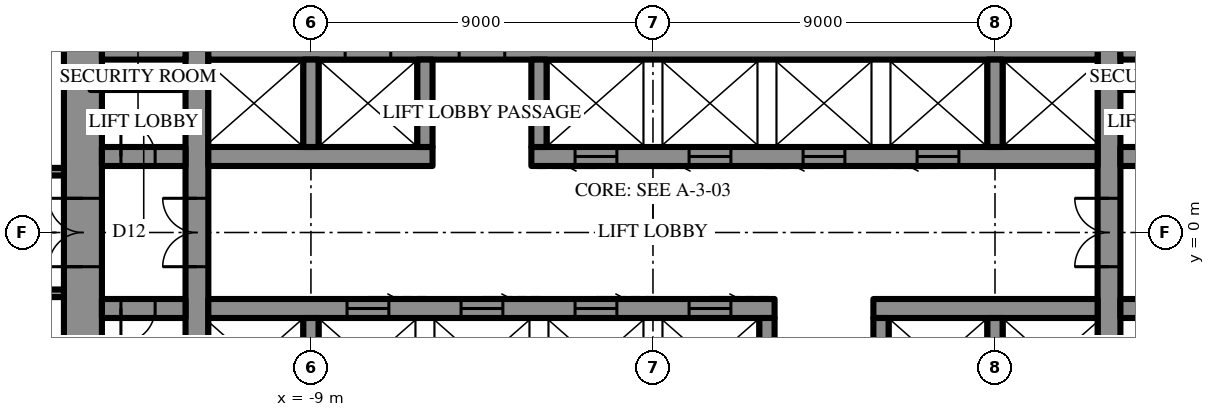
"""IFC4 building model, lengths in metres.
Left out: names, types, materials, properties, quantities, classifications, styles, units other than length and angle.
Written with IfcOpenShell. Run it as: python <this file> out.ifc"""

import sys

from ifc_helpers import new_model, si_unit, direction, frame, frame_2d, origin, place, context, subcontext, project, spatial, rectangle, extrude, element, fill, save


model = new_model("IFC4")
c1 = context("Model", 3, precision=1e-05, world=origin(), true_north=direction((0.0, 1.0)))
c2 = subcontext(c1, "Body", "Model", "MODEL_VIEW")
j1 = project(units=[si_unit("LENGTHUNIT", "METRE"), si_unit("PLANEANGLEUNIT", "RADIAN")], contexts=[c1])
p1 = place(None, origin())
s1 = spatial("IfcSite", under=j1, at=p1, CompositionType="ELEMENT")
p2 = place(p1, origin())
s2 = spatial("IfcBuilding", under=s1, at=p2, CompositionType="ELEMENT")
p3 = place(p2, frame((0.0, 0.0, 253.3)))
s3 = spatial("IfcBuildingStorey", under=s2, at=p3, CompositionType="ELEMENT", Elevation=253.3)
p4 = place(p3, frame((-15.0, 10.7, 0.0), z_axis=(0.0, 0.0, 1.0), x_axis=(0.0, -1.0, 0.0)))
e1 = element("IfcWall", 1, at=p4, inside=s3, PredefinedType="SHEAR", context=c2, shape_type="SweptSolid", body=[
    extrude(rectangle(XDim=21.4, YDim=1.0, at=frame_2d((10.7, 0.0))), origin(), (0.0, 0.0, 1.0), 4.2),
])
p5 = place(p4, frame((9.8, 0.0, 0.0)))
e2 = element("IfcOpeningElement", 2, at=p5, cuts=e1, PredefinedType="OPENING", context=c2, shape_type="SweptSolid", body=[
    extrude(rectangle(XDim=1.8, YDim=2.4, at=frame_2d((0.9, 1.2))), frame((0.0, 0.51, 0.0), z_axis=(0.0, -1.0, 0.0), x_axis=(1.0, 0.0, 0.0)), (0.0, 0.0, 1.0), 1.02),
])
p6 = place(p3, frame((12.0, -10.7, 0.0), z_axis=(0.0, 0.0, 1.0), x_axis=(0.0, 1.0, 0.0)))
e3 = element("IfcWall", 3, at=p6, inside=s3, PredefinedType="SHEAR", context=c2, shape_type="SweptSolid", body=[
    extrude(rectangle(XDim=21.4, YDim=0.6, at=frame_2d((10.7, 0.0))), origin(), (0.0, 0.0, 1.0), 4.2),
])
p7 = place(p6, frame((9.8, 0.0, 0.0)))
e4 = element("IfcOpeningElement", 4, at=p7, cuts=e3, PredefinedType="OPENING", context=c2, shape_type="SweptSolid", body=[
    extrude(rectangle(XDim=1.8, YDim=2.4, at=frame_2d((0.9, 1.2))), frame((0.0, 0.31, 0.0), z_axis=(0.0, -1.0, 0.0), x_axis=(1.0, 0.0, 0.0)), (0.0, 0.0, 1.0), 0.62),
])
p8 = place(p3, frame((-12.0, -10.7, 0.0), z_axis=(0.0, 0.0, 1.0), x_axis=(0.0, 1.0, 0.0)))
e5 = element("IfcWall", 5, at=p8, inside=s3, PredefinedType="SHEAR", context=c2, shape_type="SweptSolid", body=[
    extrude(rectangle(XDim=21.4, YDim=0.6, at=frame_2d((10.7, 0.0))), origin(), (0.0, 0.0, 1.0), 4.2),
])
p9 = place(p8, frame((9.8, 0.0, 0.0)))
e6 = element("IfcOpeningElement", 6, at=p9, cuts=e5, PredefinedType="OPENING", context=c2, shape_type="SweptSolid", body=[
    extrude(rectangle(XDim=1.8, YDim=2.4, at=frame_2d((0.9, 1.2))), frame((0.0, 0.31, 0.0), z_axis=(0.0, -1.0, 0.0), x_axis=(1.0, 0.0, 0.0)), (0.0, 0.0, 1.0), 0.62),
])
p10 = place(p3, frame((-14.5, 2.0, 0.0), z_axis=(0.0, 0.0, 1.0), x_axis=(1.0, 0.0, 0.0)))
e7 = element("IfcWall", 7, at=p10, inside=s3, PredefinedType="SHEAR", context=c2, shape_type="SweptSolid", body=[
    extrude(rectangle(XDim=2.2, YDim=0.5, at=frame_2d((1.1, 0.0))), origin(), (0.0, 0.0, 1.0), 4.2),
])
p11 = place(p10, frame((0.5, 0.0, 0.0)))
e8 = element("IfcOpeningElement", 8, at=p11, cuts=e7, PredefinedType="OPENING", context=c2, shape_type="SweptSolid", body=[
    extrude(rectangle(XDim=0.9, YDim=2.2, at=frame_2d((0.45, 1.1))), frame((0.0, 0.26, 0.0), z_axis=(0.0, -1.0, 0.0), x_axis=(1.0, 0.0, 0.0)), (0.0, 0.0, 1.0), 0.52),
])
p12 = place(p3, frame((-11.7, 2.0, 0.0), z_axis=(0.0, 0.0, 1.0), x_axis=(1.0, 0.0, 0.0)))
e9 = element("IfcWall", 9, at=p12, inside=s3, PredefinedType="SHEAR", context=c2, shape_type="SweptSolid", body=[
    extrude(rectangle(XDim=5.9, YDim=0.5, at=frame_2d((2.95, 0.0))), origin(), (0.0, 0.0, 1.0), 4.2),
])
p13 = place(p3, frame((-3.2, 2.0, 0.0), z_axis=(0.0, 0.0, 1.0), x_axis=(1.0, 0.0, 0.0)))
e10 = element("IfcWall", 10, at=p13, inside=s3, PredefinedType="SHEAR", context=c2, shape_type="SweptSolid", body=[
    extrude(rectangle(XDim=14.9, YDim=0.5, at=frame_2d((7.45, 0.0))), origin(), (0.0, 0.0, 1.0), 4.2),
])
p14 = place(p13, frame((1.15, 0.0, 0.0)))
e11 = element("IfcOpeningElement", 11, at=p14, cuts=e10, PredefinedType="OPENING", context=c2, shape_type="SweptSolid", body=[
    extrude(rectangle(XDim=1.1, YDim=2.2, at=frame_2d((0.55, 1.1))), frame((0.0, 0.26, 0.0), z_axis=(0.0, -1.0, 0.0), x_axis=(1.0, 0.0, 0.0)), (0.0, 0.0, 1.0), 0.52),
])
p15 = place(p13, frame((4.15, 0.0, 0.0)))
e12 = element("IfcOpeningElement", 12, at=p15, cuts=e10, PredefinedType="OPENING", context=c2, shape_type="SweptSolid", body=[
    extrude(rectangle(XDim=1.1, YDim=2.2, at=frame_2d((0.55, 1.1))), frame((0.0, 0.26, 0.0), z_axis=(0.0, -1.0, 0.0), x_axis=(1.0, 0.0, 0.0)), (0.0, 0.0, 1.0), 0.52),
])
p16 = place(p13, frame((7.15, 0.0, 0.0)))
e13 = element("IfcOpeningElement", 13, at=p16, cuts=e10, PredefinedType="OPENING", context=c2, shape_type="SweptSolid", body=[
    extrude(rectangle(XDim=1.1, YDim=2.2, at=frame_2d((0.55, 1.1))), frame((0.0, 0.26, 0.0), z_axis=(0.0, -1.0, 0.0), x_axis=(1.0, 0.0, 0.0)), (0.0, 0.0, 1.0), 0.52),
])
p17 = place(p13, frame((10.15, 0.0, 0.0)))
e14 = element("IfcOpeningElement", 14, at=p17, cuts=e10, PredefinedType="OPENING", context=c2, shape_type="SweptSolid", body=[
    extrude(rectangle(XDim=1.1, YDim=2.2, at=frame_2d((0.55, 1.1))), frame((0.0, 0.26, 0.0), z_axis=(0.0, -1.0, 0.0), x_axis=(1.0, 0.0, 0.0)), (0.0, 0.0, 1.0), 0.52),
])
p18 = place(p3, frame((12.3, 2.0, 0.0), z_axis=(0.0, 0.0, 1.0), x_axis=(1.0, 0.0, 0.0)))
e15 = element("IfcWall", 15, at=p18, inside=s3, PredefinedType="SHEAR", context=c2, shape_type="SweptSolid", body=[
    extrude(rectangle(XDim=2.2, YDim=0.5, at=frame_2d((1.1, 0.0))), origin(), (0.0, 0.0, 1.0), 4.2),
])
p19 = place(p18, frame((0.8, 0.0, 0.0)))
e16 = element("IfcOpeningElement", 16, at=p19, cuts=e15, PredefinedType="OPENING", context=c2, shape_type="SweptSolid", body=[
    extrude(rectangle(XDim=0.9, YDim=2.2, at=frame_2d((0.45, 1.1))), frame((0.0, 0.26, 0.0), z_axis=(0.0, -1.0, 0.0), x_axis=(1.0, 0.0, 0.0)), (0.0, 0.0, 1.0), 0.52),
])
p20 = place(p3, frame((-14.5, 4.8, 0.0), z_axis=(0.0, 0.0, 1.0), x_axis=(1.0, 0.0, 0.0)))
e17 = element("IfcWall", 17, at=p20, inside=s3, PredefinedType="SHEAR", context=c2, shape_type="SweptSolid", body=[
    extrude(rectangle(XDim=2.2, YDim=0.5, at=frame_2d((1.1, 0.0))), origin(), (0.0, 0.0, 1.0), 4.2),
])
p21 = place(p3, frame((-11.7, 4.8, 0.0), z_axis=(0.0, 0.0, 1.0), x_axis=(1.0, 0.0, 0.0)))
e18 = element("IfcWall", 18, at=p21, inside=s3, PredefinedType="SHEAR", context=c2, shape_type="SweptSolid", body=[
    extrude(rectangle(XDim=23.4, YDim=0.5, at=frame_2d((11.7, 0.0))), origin(), (0.0, 0.0, 1.0), 4.2),
])
p22 = place(p21, frame((6.6, 0.0, 0.0)))
e19 = element("IfcOpeningElement", 19, at=p22, cuts=e18, PredefinedType="OPENING", context=c2, shape_type="SweptSolid", body=[
    extrude(rectangle(XDim=1.2, YDim=2.2, at=frame_2d((0.6, 1.1))), frame((0.0, 0.26, 0.0), z_axis=(0.0, -1.0, 0.0), x_axis=(1.0, 0.0, 0.0)), (0.0, 0.0, 1.0), 0.52),
])
p23 = place(p21, frame((3.6, 0.0, 0.0)))
e20 = element("IfcOpeningElement", 20, at=p23, cuts=e18, PredefinedType="OPENING", context=c2, shape_type="SweptSolid", body=[
    extrude(rectangle(XDim=1.2, YDim=2.2, at=frame_2d((0.6, 1.1))), frame((0.0, 0.26, 0.0), z_axis=(0.0, -1.0, 0.0), x_axis=(1.0, 0.0, 0.0)), (0.0, 0.0, 1.0), 0.52),
])
p24 = place(p3, frame((12.3, 4.8, 0.0), z_axis=(0.0, 0.0, 1.0), x_axis=(1.0, 0.0, 0.0)))
e21 = element("IfcWall", 21, at=p24, inside=s3, PredefinedType="SHEAR", context=c2, shape_type="SweptSolid", body=[
    extrude(rectangle(XDim=2.2, YDim=0.5, at=frame_2d((1.1, 0.0))), origin(), (0.0, 0.0, 1.0), 4.2),
])
for number, where, z_axis, x_axis in (
    (22, (-9.0, 2.25, 0.0), (0.0, 0.0, 1.0), (0.0, 1.0, 0.0)),
    (23, (-6.0, 2.25, 0.0), (0.0, 0.0, 1.0), (0.0, 1.0, 0.0)),
    (24, (-3.0, 2.25, 0.0), (0.0, 0.0, 1.0), (0.0, 1.0, 0.0)),
    (25, (9.0, 2.25, 0.0), (0.0, 0.0, 1.0), (0.0, 1.0, 0.0)),
):
    element("IfcWall", number, at=place(p3, frame(where, z_axis=z_axis, x_axis=x_axis)), inside=s3, PredefinedType="SHEAR", context=c2, shape_type="SweptSolid", body=[
        extrude(rectangle(XDim=2.3, YDim=0.4, at=frame_2d((1.15, 0.0))), origin(), (0.0, 0.0, 1.0), 4.2),
    ])
p25 = place(p3, frame((14.5, -2.0, 0.0), z_axis=(0.0, 0.0, 1.0), x_axis=(-1.0, 0.0, 0.0)))
e26 = element("IfcWall", 26, at=p25, inside=s3, PredefinedType="SHEAR", context=c2, shape_type="SweptSolid", body=[
    extrude(rectangle(XDim=2.2, YDim=0.5, at=frame_2d((1.1, 0.0))), origin(), (0.0, 0.0, 1.0), 4.2),
])
p26 = place(p25, frame((0.5, 0.0, 0.0)))
e27 = element("IfcOpeningElement", 27, at=p26, cuts=e26, PredefinedType="OPENING", context=c2, shape_type="SweptSolid", body=[
    extrude(rectangle(XDim=0.9, YDim=2.2, at=frame_2d((0.45, 1.1))), frame((0.0, 0.26, 0.0), z_axis=(0.0, -1.0, 0.0), x_axis=(1.0, 0.0, 0.0)), (0.0, 0.0, 1.0), 0.52),
])
p27 = place(p3, frame((11.7, -2.0, 0.0), z_axis=(0.0, 0.0, 1.0), x_axis=(-1.0, 0.0, 0.0)))
e28 = element("IfcWall", 28, at=p27, inside=s3, PredefinedType="SHEAR", context=c2, shape_type="SweptSolid", body=[
    extrude(rectangle(XDim=5.9, YDim=0.5, at=frame_2d((2.95, 0.0))), origin(), (0.0, 0.0, 1.0), 4.2),
])
p28 = place(p3, frame((3.2, -2.0, 0.0), z_axis=(0.0, 0.0, 1.0), x_axis=(-1.0, 0.0, 0.0)))
e29 = element("IfcWall", 29, at=p28, inside=s3, PredefinedType="SHEAR", context=c2, shape_type="SweptSolid", body=[
    extrude(rectangle(XDim=14.9, YDim=0.5, at=frame_2d((7.45, 0.0))), origin(), (0.0, 0.0, 1.0), 4.2),
])
p29 = place(p28, frame((1.15, 0.0, 0.0)))
e30 = element("IfcOpeningElement", 30, at=p29, cuts=e29, PredefinedType="OPENING", context=c2, shape_type="SweptSolid", body=[
    extrude(rectangle(XDim=1.1, YDim=2.2, at=frame_2d((0.55, 1.1))), frame((0.0, 0.26, 0.0), z_axis=(0.0, -1.0, 0.0), x_axis=(1.0, 0.0, 0.0)), (0.0, 0.0, 1.0), 0.52),
])
p30 = place(p28, frame((4.15, 0.0, 0.0)))
e31 = element("IfcOpeningElement", 31, at=p30, cuts=e29, PredefinedType="OPENING", context=c2, shape_type="SweptSolid", body=[
    extrude(rectangle(XDim=1.1, YDim=2.2, at=frame_2d((0.55, 1.1))), frame((0.0, 0.26, 0.0), z_axis=(0.0, -1.0, 0.0), x_axis=(1.0, 0.0, 0.0)), (0.0, 0.0, 1.0), 0.52),
])
p31 = place(p28, frame((7.15, 0.0, 0.0)))
e32 = element("IfcOpeningElement", 32, at=p31, cuts=e29, PredefinedType="OPENING", context=c2, shape_type="SweptSolid", body=[
    extrude(rectangle(XDim=1.1, YDim=2.2, at=frame_2d((0.55, 1.1))), frame((0.0, 0.26, 0.0), z_axis=(0.0, -1.0, 0.0), x_axis=(1.0, 0.0, 0.0)), (0.0, 0.0, 1.0), 0.52),
])
p32 = place(p28, frame((10.15, 0.0, 0.0)))
e33 = element("IfcOpeningElement", 33, at=p32, cuts=e29, PredefinedType="OPENING", context=c2, shape_type="SweptSolid", body=[
    extrude(rectangle(XDim=1.1, YDim=2.2, at=frame_2d((0.55, 1.1))), frame((0.0, 0.26, 0.0), z_axis=(0.0, -1.0, 0.0), x_axis=(1.0, 0.0, 0.0)), (0.0, 0.0, 1.0), 0.52),
])
p33 = place(p3, frame((-12.3, -2.0, 0.0), z_axis=(0.0, 0.0, 1.0), x_axis=(-1.0, 0.0, 0.0)))
e34 = element("IfcWall", 34, at=p33, inside=s3, PredefinedType="SHEAR", context=c2, shape_type="SweptSolid", body=[
    extrude(rectangle(XDim=2.2, YDim=0.5, at=frame_2d((1.1, 0.0))), origin(), (0.0, 0.0, 1.0), 4.2),
])
p34 = place(p33, frame((0.8, 0.0, 0.0)))
e35 = element("IfcOpeningElement", 35, at=p34, cuts=e34, PredefinedType="OPENING", context=c2, shape_type="SweptSolid", body=[
    extrude(rectangle(XDim=0.9, YDim=2.2, at=frame_2d((0.45, 1.1))), frame((0.0, 0.26, 0.0), z_axis=(0.0, -1.0, 0.0), x_axis=(1.0, 0.0, 0.0)), (0.0, 0.0, 1.0), 0.52),
])
for number, where, z_axis, x_axis in (
    (36, (9.0, -2.25, 0.0), (0.0, 0.0, 1.0), (0.0, -1.0, 0.0)),
    (37, (6.0, -2.25, 0.0), (0.0, 0.0, 1.0), (0.0, -1.0, 0.0)),
    (38, (3.0, -2.25, 0.0), (0.0, 0.0, 1.0), (0.0, -1.0, 0.0)),
    (39, (-9.0, -2.25, 0.0), (0.0, 0.0, 1.0), (0.0, -1.0, 0.0)),
):
    element("IfcWall", number, at=place(p3, frame(where, z_axis=z_axis, x_axis=x_axis)), inside=s3, PredefinedType="SHEAR", context=c2, shape_type="SweptSolid", body=[
        extrude(rectangle(XDim=2.3, YDim=0.4, at=frame_2d((1.15, 0.0))), origin(), (0.0, 0.0, 1.0), 4.2),
    ])
for number, where, z_axis, x_axis in (
    (40, (-14.8, 3.85, 0.0), (0.0, 0.0, 1.0), (1.0, 0.0, 0.0)),
    (41, (12.3, 3.85, 0.0), (0.0, 0.0, 1.0), (1.0, 0.0, 0.0)),
):
    element("IfcWall", number, at=place(p3, frame(where, z_axis=z_axis, x_axis=x_axis)), inside=s3, PredefinedType="PARTITIONING", context=c2, shape_type="SweptSolid", body=[
        extrude(rectangle(XDim=2.5, YDim=0.2, at=frame_2d((1.25, 0.0))), origin(), (0.0, 0.0, 1.0), 4.0),
    ])
p35 = place(p3, frame((-15.5, 1.6, 0.0), z_axis=(0.0, 0.0, 1.0), x_axis=(-1.0, 0.0, 0.0)))
e42 = element("IfcWall", 42, at=p35, inside=s3, PredefinedType="PARTITIONING", context=c2, shape_type="SweptSolid", body=[
    extrude(rectangle(XDim=10.7, YDim=0.2, at=frame_2d((5.35, 0.0))), origin(), (0.0, 0.0, 1.0), 4.0),
])
p36 = place(p35, frame((4.85, 0.0, 0.0)))
e43 = element("IfcOpeningElement", 43, at=p36, cuts=e42, PredefinedType="OPENING", context=c2, shape_type="SweptSolid", body=[
    extrude(rectangle(XDim=1.0, YDim=2.2, at=frame_2d((0.5, 1.1))), frame((0.0, 0.11, 0.0), z_axis=(0.0, -1.0, 0.0), x_axis=(1.0, 0.0, 0.0)), (0.0, 0.0, 1.0), 0.22),
])
p37 = place(p3, frame((-15.5, -1.6, 0.0), z_axis=(0.0, 0.0, 1.0), x_axis=(-1.0, 0.0, 0.0)))
e44 = element("IfcWall", 44, at=p37, inside=s3, PredefinedType="PARTITIONING", context=c2, shape_type="SweptSolid", body=[
    extrude(rectangle(XDim=10.7, YDim=0.2, at=frame_2d((5.35, 0.0))), origin(), (0.0, 0.0, 1.0), 4.0),
])
p38 = place(p37, frame((4.85, 0.0, 0.0)))
e45 = element("IfcOpeningElement", 45, at=p38, cuts=e44, PredefinedType="OPENING", context=c2, shape_type="SweptSolid", body=[
    extrude(rectangle(XDim=1.0, YDim=2.2, at=frame_2d((0.5, 1.1))), frame((0.0, 0.11, 0.0), z_axis=(0.0, -1.0, 0.0), x_axis=(1.0, 0.0, 0.0)), (0.0, 0.0, 1.0), 0.22),
])
p39 = place(p5, frame((1.8, 0.0, 0.0), z_axis=(0.0, 0.0, 1.0), x_axis=(-1.0, 0.0, 0.0)))
e46 = element("IfcDoor", 46, at=p39, inside=s3, OperationType="DOUBLE_DOOR_SINGLE_SWING", PredefinedType="DOOR", context=c2, shape_type="SweptSolid", body=[
    extrude(rectangle(XDim=1.8, YDim=2.4, at=frame_2d((0.9, 1.2))), frame((0.0, 0.025, 0.0), z_axis=(0.0, -1.0, 0.0), x_axis=(1.0, 0.0, 0.0)), (0.0, 0.0, 1.0), 0.05),
])
fill(e2, e46)
p40 = place(p11, origin())
e47 = element("IfcDoor", 47, at=p40, inside=s3, OperationType="SINGLE_SWING_RIGHT", PredefinedType="DOOR", context=c2, shape_type="SweptSolid", body=[
    extrude(rectangle(XDim=0.9, YDim=2.2, at=frame_2d((0.45, 1.1))), frame((0.0, 0.025, 0.0), z_axis=(0.0, -1.0, 0.0), x_axis=(1.0, 0.0, 0.0)), (0.0, 0.0, 1.0), 0.05),
])
fill(e8, e47)
p41 = place(p34, origin())
e48 = element("IfcDoor", 48, at=p41, inside=s3, OperationType="SINGLE_SWING_LEFT", PredefinedType="DOOR", context=c2, shape_type="SweptSolid", body=[
    extrude(rectangle(XDim=0.9, YDim=2.2, at=frame_2d((0.45, 1.1))), frame((0.0, 0.025, 0.0), z_axis=(0.0, -1.0, 0.0), x_axis=(1.0, 0.0, 0.0)), (0.0, 0.0, 1.0), 0.05),
])
fill(e35, e48)
p42 = place(p7, origin())
e49 = element("IfcDoor", 49, at=p42, inside=s3, OperationType="DOUBLE_DOOR_SINGLE_SWING", PredefinedType="DOOR", context=c2, shape_type="SweptSolid", body=[
    extrude(rectangle(XDim=1.8, YDim=2.4, at=frame_2d((0.9, 1.2))), frame((0.0, 0.025, 0.0), z_axis=(0.0, -1.0, 0.0), x_axis=(1.0, 0.0, 0.0)), (0.0, 0.0, 1.0), 0.05),
])
fill(e4, e49)
p43 = place(p9, origin())
e50 = element("IfcDoor", 50, at=p43, inside=s3, OperationType="DOUBLE_DOOR_SINGLE_SWING", PredefinedType="DOOR", context=c2, shape_type="SweptSolid", body=[
    extrude(rectangle(XDim=1.8, YDim=2.4, at=frame_2d((0.9, 1.2))), frame((0.0, 0.025, 0.0), z_axis=(0.0, -1.0, 0.0), x_axis=(1.0, 0.0, 0.0)), (0.0, 0.0, 1.0), 0.05),
])
fill(e6, e50)
p44 = place(p14, frame((1.1, 0.0, 0.0), z_axis=(0.0, 0.0, 1.0), x_axis=(-1.0, 0.0, 0.0)))
e51 = element("IfcDoor", 51, at=p44, inside=s3, OperationType="SLIDING_TO_LEFT", PredefinedType="DOOR", context=c2, shape_type="SweptSolid", body=[
    extrude(rectangle(XDim=1.1, YDim=2.2, at=frame_2d((0.55, 1.1))), frame((0.0, 0.025, 0.0), z_axis=(0.0, -1.0, 0.0), x_axis=(1.0, 0.0, 0.0)), (0.0, 0.0, 1.0), 0.05),
])
fill(e11, e51)
p45 = place(p15, frame((1.1, 0.0, 0.0), z_axis=(0.0, 0.0, 1.0), x_axis=(-1.0, 0.0, 0.0)))
e52 = element("IfcDoor", 52, at=p45, inside=s3, OperationType="SLIDING_TO_LEFT", PredefinedType="DOOR", context=c2, shape_type="SweptSolid", body=[
    extrude(rectangle(XDim=1.1, YDim=2.2, at=frame_2d((0.55, 1.1))), frame((0.0, 0.025, 0.0), z_axis=(0.0, -1.0, 0.0), x_axis=(1.0, 0.0, 0.0)), (0.0, 0.0, 1.0), 0.05),
])
fill(e12, e52)
p46 = place(p16, frame((1.1, 0.0, 0.0), z_axis=(0.0, 0.0, 1.0), x_axis=(-1.0, 0.0, 0.0)))
e53 = element("IfcDoor", 53, at=p46, inside=s3, OperationType="SLIDING_TO_LEFT", PredefinedType="DOOR", context=c2, shape_type="SweptSolid", body=[
    extrude(rectangle(XDim=1.1, YDim=2.2, at=frame_2d((0.55, 1.1))), frame((0.0, 0.025, 0.0), z_axis=(0.0, -1.0, 0.0), x_axis=(1.0, 0.0, 0.0)), (0.0, 0.0, 1.0), 0.05),
])
fill(e13, e53)
p47 = place(p17, frame((1.1, 0.0, 0.0), z_axis=(0.0, 0.0, 1.0), x_axis=(-1.0, 0.0, 0.0)))
e54 = element("IfcDoor", 54, at=p47, inside=s3, OperationType="SLIDING_TO_LEFT", PredefinedType="DOOR", context=c2, shape_type="SweptSolid", body=[
    extrude(rectangle(XDim=1.1, YDim=2.2, at=frame_2d((0.55, 1.1))), frame((0.0, 0.025, 0.0), z_axis=(0.0, -1.0, 0.0), x_axis=(1.0, 0.0, 0.0)), (0.0, 0.0, 1.0), 0.05),
])
fill(e14, e54)
p48 = place(p29, frame((1.1, 0.0, 0.0), z_axis=(0.0, 0.0, 1.0), x_axis=(-1.0, 0.0, 0.0)))
e55 = element("IfcDoor", 55, at=p48, inside=s3, OperationType="SLIDING_TO_LEFT", PredefinedType="DOOR", context=c2, shape_type="SweptSolid", body=[
    extrude(rectangle(XDim=1.1, YDim=2.2, at=frame_2d((0.55, 1.1))), frame((0.0, 0.025, 0.0), z_axis=(0.0, -1.0, 0.0), x_axis=(1.0, 0.0, 0.0)), (0.0, 0.0, 1.0), 0.05),
])
fill(e30, e55)
p49 = place(p30, frame((1.1, 0.0, 0.0), z_axis=(0.0, 0.0, 1.0), x_axis=(-1.0, 0.0, 0.0)))
e56 = element("IfcDoor", 56, at=p49, inside=s3, OperationType="SLIDING_TO_LEFT", PredefinedType="DOOR", context=c2, shape_type="SweptSolid", body=[
    extrude(rectangle(XDim=1.1, YDim=2.2, at=frame_2d((0.55, 1.1))), frame((0.0, 0.025, 0.0), z_axis=(0.0, -1.0, 0.0), x_axis=(1.0, 0.0, 0.0)), (0.0, 0.0, 1.0), 0.05),
])
fill(e31, e56)
p50 = place(p31, frame((1.1, 0.0, 0.0), z_axis=(0.0, 0.0, 1.0), x_axis=(-1.0, 0.0, 0.0)))
e57 = element("IfcDoor", 57, at=p50, inside=s3, OperationType="SLIDING_TO_LEFT", PredefinedType="DOOR", context=c2, shape_type="SweptSolid", body=[
    extrude(rectangle(XDim=1.1, YDim=2.2, at=frame_2d((0.55, 1.1))), frame((0.0, 0.025, 0.0), z_axis=(0.0, -1.0, 0.0), x_axis=(1.0, 0.0, 0.0)), (0.0, 0.0, 1.0), 0.05),
])
fill(e32, e57)
p51 = place(p32, frame((1.1, 0.0, 0.0), z_axis=(0.0, 0.0, 1.0), x_axis=(-1.0, 0.0, 0.0)))
e58 = element("IfcDoor", 58, at=p51, inside=s3, OperationType="SLIDING_TO_LEFT", PredefinedType="DOOR", context=c2, shape_type="SweptSolid", body=[
    extrude(rectangle(XDim=1.1, YDim=2.2, at=frame_2d((0.55, 1.1))), frame((0.0, 0.025, 0.0), z_axis=(0.0, -1.0, 0.0), x_axis=(1.0, 0.0, 0.0)), (0.0, 0.0, 1.0), 0.05),
])
fill(e33, e58)
save(model, sys.argv[1])
